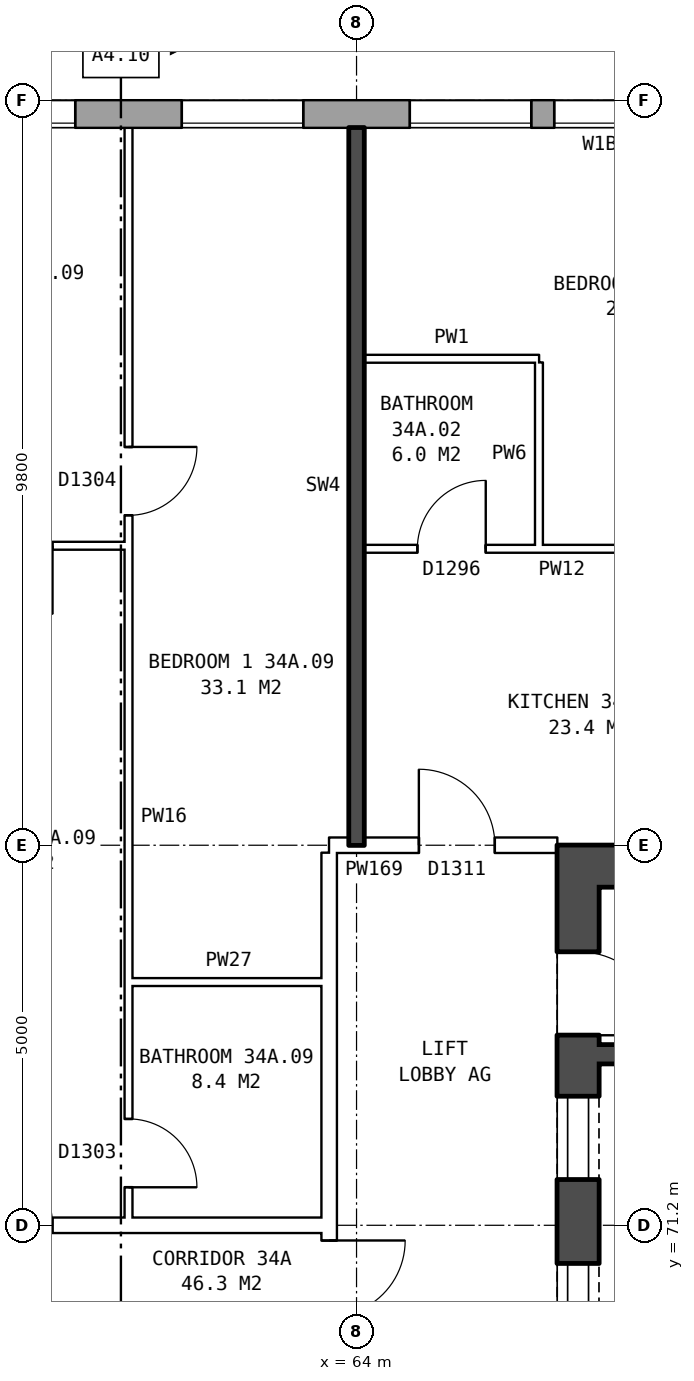
"""IFC4 building model, lengths in metres.
Left out: names, types, materials, properties, quantities, classifications, styles, units other than length and angle.
Written with IfcOpenShell. Run it as: python <this file> out.ifc"""

import sys

from ifc_helpers import new_model, si_unit, direction, frame, frame_2d, origin, place, context, subcontext, project, spatial, rectangle, extrude, element, fill, save


model = new_model("IFC4")
c1 = context("Model", 3, precision=1e-05, world=origin(), true_north=direction((0.0, 1.0)))
c2 = subcontext(c1, "Body", "Model", "MODEL_VIEW")
j1 = project(units=[si_unit("LENGTHUNIT", "METRE"), si_unit("PLANEANGLEUNIT", "RADIAN")], contexts=[c1])
p1 = place(None, origin())
s1 = spatial("IfcSite", under=j1, at=p1, CompositionType="ELEMENT")
p2 = place(p1, origin())
s2 = spatial("IfcBuilding", under=s1, at=p2, CompositionType="ELEMENT")
p3 = place(p2, frame((0.0, 0.0, 123.7)))
s3 = spatial("IfcBuildingStorey", under=s2, at=p3, CompositionType="ELEMENT", Elevation=123.7)
p4 = place(p3, frame((72.925, 85.82, 0.0), z_axis=(0.0, 0.0, 1.0), x_axis=(-1.0, 0.0, 0.0)))
e1 = element("IfcWall", 1, at=p4, inside=s3, PredefinedType="STANDARD", context=c2, shape_type="SweptSolid", body=[
    extrude(rectangle(XDim=43.101, YDim=0.36, at=frame_2d((21.55, 0.0))), origin(), (0.0, 0.0, 1.0), 2.85),
])
p5 = place(p4, frame((0.625, 0.0, 0.8)))
e2 = element("IfcOpeningElement", 2, at=p5, cuts=e1, PredefinedType="OPENING", context=c2, shape_type="SweptSolid", body=[
    extrude(rectangle(XDim=1.6, YDim=1.8, at=frame_2d((0.8, 0.9))), frame((0.0, 0.19, 0.0), z_axis=(0.0, -1.0, 0.0), x_axis=(1.0, 0.0, 0.0)), (0.0, 0.0, 1.0), 0.38),
])
p6 = place(p4, frame((4.125, 0.0, 0.8)))
e3 = element("IfcOpeningElement", 3, at=p6, cuts=e1, PredefinedType="OPENING", context=c2, shape_type="SweptSolid", body=[
    extrude(rectangle(XDim=0.6, YDim=0.9, at=frame_2d((0.3, 0.45))), frame((0.0, 0.19, 0.0), z_axis=(0.0, -1.0, 0.0), x_axis=(1.0, 0.0, 0.0)), (0.0, 0.0, 1.0), 0.38),
])
p7 = place(p4, frame((6.625, 0.0, 0.8)))
e4 = element("IfcOpeningElement", 4, at=p7, cuts=e1, PredefinedType="OPENING", context=c2, shape_type="SweptSolid", body=[
    extrude(rectangle(XDim=1.6, YDim=1.8, at=frame_2d((0.8, 0.9))), frame((0.0, 0.19, 0.0), z_axis=(0.0, -1.0, 0.0), x_axis=(1.0, 0.0, 0.0)), (0.0, 0.0, 1.0), 0.38),
])
p8 = place(p4, frame((9.625, 0.0, 0.8)))
e5 = element("IfcOpeningElement", 5, at=p8, cuts=e1, PredefinedType="OPENING", context=c2, shape_type="SweptSolid", body=[
    extrude(rectangle(XDim=1.6, YDim=1.8, at=frame_2d((0.8, 0.9))), frame((0.0, 0.19, 0.0), z_axis=(0.0, -1.0, 0.0), x_axis=(1.0, 0.0, 0.0)), (0.0, 0.0, 1.0), 0.38),
])
p9 = place(p4, frame((12.625, 0.0, 0.8)))
e6 = element("IfcOpeningElement", 6, at=p9, cuts=e1, PredefinedType="OPENING", context=c2, shape_type="SweptSolid", body=[
    extrude(rectangle(XDim=1.6, YDim=1.8, at=frame_2d((0.8, 0.9))), frame((0.0, 0.19, 0.0), z_axis=(0.0, -1.0, 0.0), x_axis=(1.0, 0.0, 0.0)), (0.0, 0.0, 1.0), 0.38),
])
p10 = place(p4, frame((15.625, 0.0, 0.8)))
e7 = element("IfcOpeningElement", 7, at=p10, cuts=e1, PredefinedType="OPENING", context=c2, shape_type="SweptSolid", body=[
    extrude(rectangle(XDim=1.6, YDim=1.8, at=frame_2d((0.8, 0.9))), frame((0.0, 0.19, 0.0), z_axis=(0.0, -1.0, 0.0), x_axis=(1.0, 0.0, 0.0)), (0.0, 0.0, 1.0), 0.38),
])
p11 = place(p4, frame((18.625, 0.0, 0.8)))
e8 = element("IfcOpeningElement", 8, at=p11, cuts=e1, PredefinedType="OPENING", context=c2, shape_type="SweptSolid", body=[
    extrude(rectangle(XDim=1.6, YDim=1.8, at=frame_2d((0.8, 0.9))), frame((0.0, 0.19, 0.0), z_axis=(0.0, -1.0, 0.0), x_axis=(1.0, 0.0, 0.0)), (0.0, 0.0, 1.0), 0.38),
])
p12 = place(p4, frame((21.625, 0.0, 0.8)))
e9 = element("IfcOpeningElement", 9, at=p12, cuts=e1, PredefinedType="OPENING", context=c2, shape_type="SweptSolid", body=[
    extrude(rectangle(XDim=1.6, YDim=1.8, at=frame_2d((0.8, 0.9))), frame((0.0, 0.19, 0.0), z_axis=(0.0, -1.0, 0.0), x_axis=(1.0, 0.0, 0.0)), (0.0, 0.0, 1.0), 0.38),
])
p13 = place(p4, frame((24.625, 0.0, 0.8)))
e10 = element("IfcOpeningElement", 10, at=p13, cuts=e1, PredefinedType="OPENING", context=c2, shape_type="SweptSolid", body=[
    extrude(rectangle(XDim=1.6, YDim=1.8, at=frame_2d((0.8, 0.9))), frame((0.0, 0.19, 0.0), z_axis=(0.0, -1.0, 0.0), x_axis=(1.0, 0.0, 0.0)), (0.0, 0.0, 1.0), 0.38),
])
p14 = place(p4, frame((27.625, 0.0, 0.8)))
e11 = element("IfcOpeningElement", 11, at=p14, cuts=e1, PredefinedType="OPENING", context=c2, shape_type="SweptSolid", body=[
    extrude(rectangle(XDim=1.6, YDim=1.8, at=frame_2d((0.8, 0.9))), frame((0.0, 0.19, 0.0), z_axis=(0.0, -1.0, 0.0), x_axis=(1.0, 0.0, 0.0)), (0.0, 0.0, 1.0), 0.38),
])
p15 = place(p4, frame((30.625, 0.0, 0.8)))
e12 = element("IfcOpeningElement", 12, at=p15, cuts=e1, PredefinedType="OPENING", context=c2, shape_type="SweptSolid", body=[
    extrude(rectangle(XDim=1.6, YDim=1.8, at=frame_2d((0.8, 0.9))), frame((0.0, 0.19, 0.0), z_axis=(0.0, -1.0, 0.0), x_axis=(1.0, 0.0, 0.0)), (0.0, 0.0, 1.0), 0.38),
])
p16 = place(p4, frame((33.625, 0.0, 0.8)))
e13 = element("IfcOpeningElement", 13, at=p16, cuts=e1, PredefinedType="OPENING", context=c2, shape_type="SweptSolid", body=[
    extrude(rectangle(XDim=1.6, YDim=1.8, at=frame_2d((0.8, 0.9))), frame((0.0, 0.19, 0.0), z_axis=(0.0, -1.0, 0.0), x_axis=(1.0, 0.0, 0.0)), (0.0, 0.0, 1.0), 0.38),
])
p17 = place(p4, frame((36.625, 0.0, 0.8)))
e14 = element("IfcOpeningElement", 14, at=p17, cuts=e1, PredefinedType="OPENING", context=c2, shape_type="SweptSolid", body=[
    extrude(rectangle(XDim=1.6, YDim=1.8, at=frame_2d((0.8, 0.9))), frame((0.0, 0.19, 0.0), z_axis=(0.0, -1.0, 0.0), x_axis=(1.0, 0.0, 0.0)), (0.0, 0.0, 1.0), 0.38),
])
p18 = place(p4, frame((40.125, 0.0, 1.7)))
e15 = element("IfcOpeningElement", 15, at=p18, cuts=e1, PredefinedType="OPENING", context=c2, shape_type="SweptSolid", body=[
    extrude(rectangle(XDim=0.6, YDim=0.9, at=frame_2d((0.3, 0.45))), frame((0.0, 0.19, 0.0), z_axis=(0.0, -1.0, 0.0), x_axis=(1.0, 0.0, 0.0)), (0.0, 0.0, 1.0), 0.38),
])
p19 = place(p4, frame((5.125, 0.0, 0.8)))
e16 = element("IfcOpeningElement", 16, at=p19, cuts=e1, PredefinedType="OPENING", context=c2, shape_type="SweptSolid", body=[
    extrude(rectangle(XDim=1.2, YDim=1.8, at=frame_2d((0.6, 0.9))), frame((0.0, 0.19, 0.0), z_axis=(0.0, -1.0, 0.0), x_axis=(1.0, 0.0, 0.0)), (0.0, 0.0, 1.0), 0.38),
])
p20 = place(p4, frame((41.125, 0.0, 0.8)))
e17 = element("IfcOpeningElement", 17, at=p20, cuts=e1, PredefinedType="OPENING", context=c2, shape_type="SweptSolid", body=[
    extrude(rectangle(XDim=1.6, YDim=1.8, at=frame_2d((0.8, 0.9))), frame((0.0, 0.19, 0.0), z_axis=(0.0, -1.0, 0.0), x_axis=(1.0, 0.0, 0.0)), (0.0, 0.0, 1.0), 0.38),
])
p21 = place(p3, frame((66.915, 63.8, 0.0), z_axis=(0.0, 0.0, 1.0), x_axis=(0.0, 1.0, 0.0)))
e18 = element("IfcWall", 18, at=p21, inside=s3, PredefinedType="SHEAR", context=c2, shape_type="SweptSolid", body=[
    extrude(rectangle(XDim=12.4, YDim=0.55, at=frame_2d((6.2, 0.0))), origin(), (0.0, 0.0, 1.0), 2.85),
])
p22 = place(p21, frame((1.325, 0.0, 0.0)))
e19 = element("IfcOpeningElement", 19, at=p22, cuts=e18, PredefinedType="OPENING", context=c2, shape_type="SweptSolid", body=[
    extrude(rectangle(XDim=1.1, YDim=2.1, at=frame_2d((0.55, 1.05))), frame((0.0, 0.285, 0.0), z_axis=(0.0, -1.0, 0.0), x_axis=(1.0, 0.0, 0.0)), (0.0, 0.0, 1.0), 0.57),
])
p23 = place(p21, frame((3.6, 0.0, 0.0)))
e20 = element("IfcOpeningElement", 20, at=p23, cuts=e18, PredefinedType="OPENING", context=c2, shape_type="SweptSolid", body=[
    extrude(rectangle(XDim=1.1, YDim=2.1, at=frame_2d((0.55, 1.05))), frame((0.0, 0.285, 0.0), z_axis=(0.0, -1.0, 0.0), x_axis=(1.0, 0.0, 0.0)), (0.0, 0.0, 1.0), 0.57),
])
p24 = place(p21, frame((5.8, 0.0, 0.0)))
e21 = element("IfcOpeningElement", 21, at=p24, cuts=e18, PredefinedType="OPENING", context=c2, shape_type="SweptSolid", body=[
    extrude(rectangle(XDim=1.1, YDim=2.1, at=frame_2d((0.55, 1.05))), frame((0.0, 0.285, 0.0), z_axis=(0.0, -1.0, 0.0), x_axis=(1.0, 0.0, 0.0)), (0.0, 0.0, 1.0), 0.57),
])
p25 = place(p21, frame((8.0, 0.0, 0.0)))
e22 = element("IfcOpeningElement", 22, at=p25, cuts=e18, PredefinedType="OPENING", context=c2, shape_type="SweptSolid", body=[
    extrude(rectangle(XDim=1.1, YDim=2.1, at=frame_2d((0.55, 1.05))), frame((0.0, 0.285, 0.0), z_axis=(0.0, -1.0, 0.0), x_axis=(1.0, 0.0, 0.0)), (0.0, 0.0, 1.0), 0.57),
])
p26 = place(p21, frame((9.9, 0.0, 0.0)))
e23 = element("IfcOpeningElement", 23, at=p26, cuts=e18, PredefinedType="OPENING", context=c2, shape_type="SweptSolid", body=[
    extrude(rectangle(XDim=1.1, YDim=2.1, at=frame_2d((0.55, 1.05))), frame((0.0, 0.285, 0.0), z_axis=(0.0, -1.0, 0.0), x_axis=(1.0, 0.0, 0.0)), (0.0, 0.0, 1.0), 0.57),
])
p27 = place(p3, frame((67.19, 75.925, 0.0), z_axis=(0.0, 0.0, 1.0), x_axis=(1.0, 0.0, 0.0)))
e24 = element("IfcWall", 24, at=p27, inside=s3, PredefinedType="SHEAR", context=c2, shape_type="SweptSolid", body=[
    extrude(rectangle(XDim=7.9, YDim=0.55, at=frame_2d((3.95, 0.0))), origin(), (0.0, 0.0, 1.0), 2.85),
])
p28 = place(p3, frame((67.19, 73.45, 0.0), z_axis=(0.0, 0.0, 1.0), x_axis=(1.0, 0.0, 0.0)))
e25 = element("IfcWall", 25, at=p28, inside=s3, PredefinedType="SHEAR", context=c2, shape_type="SweptSolid", body=[
    extrude(rectangle(XDim=2.375, YDim=0.25, at=frame_2d((1.188, 0.0))), origin(), (0.0, 0.0, 1.0), 2.85),
])
p29 = place(p3, frame((63.64, 63.9, 0.0), z_axis=(0.0, 0.0, 1.0), x_axis=(0.0, 1.0, 0.0)))
e26 = element("IfcWall", 26, at=p29, inside=s3, PredefinedType="PARTITIONING", context=c2, shape_type="SweptSolid", body=[
    extrude(rectangle(XDim=12.2, YDim=0.2, at=frame_2d((6.1, 0.0))), origin(), (0.0, 0.0, 1.0), 2.85),
])
p30 = place(p29, frame((5.1, 0.0, 0.0)))
e27 = element("IfcOpeningElement", 27, at=p30, cuts=e26, PredefinedType="OPENING", context=c2, shape_type="SweptSolid", body=[
    extrude(rectangle(XDim=2.0, YDim=2.1, at=frame_2d((1.0, 1.05))), frame((0.0, 0.11, 0.0), z_axis=(0.0, -1.0, 0.0), x_axis=(1.0, 0.0, 0.0)), (0.0, 0.0, 1.0), 0.22),
])
p31 = place(p3, frame((44.36, 71.2, 0.0), z_axis=(0.0, 0.0, 1.0), x_axis=(1.0, 0.0, 0.0)))
e28 = element("IfcWall", 28, at=p31, inside=s3, PredefinedType="PARTITIONING", context=c2, shape_type="SweptSolid", body=[
    extrude(rectangle(XDim=19.28, YDim=0.2, at=frame_2d((9.64, 0.0))), origin(), (0.0, 0.0, 1.0), 2.85),
])
p32 = place(p31, frame((14.64, 0.0, 0.0)))
e29 = element("IfcOpeningElement", 29, at=p32, cuts=e28, PredefinedType="OPENING", context=c2, shape_type="SweptSolid", body=[
    extrude(rectangle(XDim=1.0, YDim=2.1, at=frame_2d((0.5, 1.05))), frame((0.0, 0.11, 0.0), z_axis=(0.0, -1.0, 0.0), x_axis=(1.0, 0.0, 0.0)), (0.0, 0.0, 1.0), 0.22),
])
p33 = place(p31, frame((5.64, 0.0, 0.0)))
e30 = element("IfcOpeningElement", 30, at=p33, cuts=e28, PredefinedType="OPENING", context=c2, shape_type="SweptSolid", body=[
    extrude(rectangle(XDim=1.0, YDim=2.1, at=frame_2d((0.5, 1.05))), frame((0.0, 0.11, 0.0), z_axis=(0.0, -1.0, 0.0), x_axis=(1.0, 0.0, 0.0)), (0.0, 0.0, 1.0), 0.22),
])
p34 = place(p3, frame((61.0, 74.4, 0.0), z_axis=(0.0, 0.0, 1.0), x_axis=(1.0, 0.0, 0.0)))
e31 = element("IfcWall", 31, at=p34, inside=s3, PredefinedType="PARTITIONING", context=c2, shape_type="SweptSolid", body=[
    extrude(rectangle(XDim=2.64, YDim=0.1, at=frame_2d((1.32, 0.0))), origin(), (0.0, 0.0, 1.0), 2.85),
])
p35 = place(p3, frame((63.64, 76.2, 0.0), z_axis=(0.0, 0.0, 1.0), x_axis=(1.0, 0.0, 0.0)))
e32 = element("IfcWall", 32, at=p35, inside=s3, PredefinedType="PARTITIONING", context=c2, shape_type="SweptSolid", body=[
    extrude(rectangle(XDim=3.0, YDim=0.2, at=frame_2d((1.5, 0.0))), origin(), (0.0, 0.0, 1.0), 2.85),
])
p36 = place(p35, frame((1.18, 0.0, 0.0)))
e33 = element("IfcOpeningElement", 33, at=p36, cuts=e32, PredefinedType="OPENING", context=c2, shape_type="SweptSolid", body=[
    extrude(rectangle(XDim=1.0, YDim=2.1, at=frame_2d((0.5, 1.05))), frame((0.0, 0.11, 0.0), z_axis=(0.0, -1.0, 0.0), x_axis=(1.0, 0.0, 0.0)), (0.0, 0.0, 1.0), 0.22),
])
p37 = place(p3, frame((64.1, 80.1, 0.0), z_axis=(0.0, 0.0, 1.0), x_axis=(1.0, 0.0, 0.0)))
e34 = element("IfcWall", 34, at=p37, inside=s3, PredefinedType="PARTITIONING", context=c2, shape_type="SweptSolid", body=[
    extrude(rectangle(XDim=5.8, YDim=0.1, at=frame_2d((2.9, 0.0))), origin(), (0.0, 0.0, 1.0), 2.85),
])
p38 = place(p37, frame((3.6, 0.0, 0.0)))
e35 = element("IfcOpeningElement", 35, at=p38, cuts=e34, PredefinedType="OPENING", context=c2, shape_type="SweptSolid", body=[
    extrude(rectangle(XDim=0.9, YDim=2.1, at=frame_2d((0.45, 1.05))), frame((0.0, 0.06, 0.0), z_axis=(0.0, -1.0, 0.0), x_axis=(1.0, 0.0, 0.0)), (0.0, 0.0, 1.0), 0.12),
])
p39 = place(p37, frame((0.7, 0.0, 0.0)))
e36 = element("IfcOpeningElement", 36, at=p39, cuts=e34, PredefinedType="OPENING", context=c2, shape_type="SweptSolid", body=[
    extrude(rectangle(XDim=0.9, YDim=2.1, at=frame_2d((0.45, 1.05))), frame((0.0, 0.06, 0.0), z_axis=(0.0, -1.0, 0.0), x_axis=(1.0, 0.0, 0.0)), (0.0, 0.0, 1.0), 0.12),
])
p40 = place(p3, frame((58.1, 80.14, 0.0), z_axis=(0.0, 0.0, 1.0), x_axis=(1.0, 0.0, 0.0)))
e37 = element("IfcWall", 37, at=p40, inside=s3, PredefinedType="PARTITIONING", context=c2, shape_type="SweptSolid", body=[
    extrude(rectangle(XDim=2.9, YDim=0.1, at=frame_2d((1.45, 0.0))), origin(), (0.0, 0.0, 1.0), 2.85),
])
p41 = place(p40, frame((1.0, 0.0, 0.0)))
e38 = element("IfcOpeningElement", 38, at=p41, cuts=e37, PredefinedType="OPENING", context=c2, shape_type="SweptSolid", body=[
    extrude(rectangle(XDim=0.9, YDim=2.1, at=frame_2d((0.45, 1.05))), frame((0.0, 0.06, 0.0), z_axis=(0.0, -1.0, 0.0), x_axis=(1.0, 0.0, 0.0)), (0.0, 0.0, 1.0), 0.12),
])
p42 = place(p3, frame((64.1, 82.6, 0.0), z_axis=(0.0, 0.0, 1.0), x_axis=(1.0, 0.0, 0.0)))
e39 = element("IfcWall", 39, at=p42, inside=s3, PredefinedType="PARTITIONING", context=c2, shape_type="SweptSolid", body=[
    extrude(rectangle(XDim=2.3, YDim=0.1, at=frame_2d((1.15, 0.0))), origin(), (0.0, 0.0, 1.0), 2.85),
])
p43 = place(p3, frame((61.0, 71.3, 0.0), z_axis=(0.0, 0.0, 1.0), x_axis=(0.0, 1.0, 0.0)))
e40 = element("IfcWall", 40, at=p43, inside=s3, PredefinedType="PARTITIONING", context=c2, shape_type="SweptSolid", body=[
    extrude(rectangle(XDim=14.34, YDim=0.1, at=frame_2d((7.17, 0.0))), origin(), (0.0, 0.0, 1.0), 2.85),
])
p44 = place(p43, frame((9.24, 0.0, 0.0)))
e41 = element("IfcOpeningElement", 41, at=p44, cuts=e40, PredefinedType="OPENING", context=c2, shape_type="SweptSolid", body=[
    extrude(rectangle(XDim=0.9, YDim=2.1, at=frame_2d((0.45, 1.05))), frame((0.0, 0.06, 0.0), z_axis=(0.0, -1.0, 0.0), x_axis=(1.0, 0.0, 0.0)), (0.0, 0.0, 1.0), 0.12),
])
p45 = place(p43, frame((0.4, 0.0, 0.0)))
e42 = element("IfcOpeningElement", 42, at=p45, cuts=e40, PredefinedType="OPENING", context=c2, shape_type="SweptSolid", body=[
    extrude(rectangle(XDim=0.9, YDim=2.1, at=frame_2d((0.45, 1.05))), frame((0.0, 0.06, 0.0), z_axis=(0.0, -1.0, 0.0), x_axis=(1.0, 0.0, 0.0)), (0.0, 0.0, 1.0), 0.12),
])
p46 = place(p3, frame((64.0, 76.2, 0.0), z_axis=(0.0, 0.0, 1.0), x_axis=(0.0, 1.0, 0.0)))
e43 = element("IfcWall", 43, at=p46, inside=s3, PredefinedType="SOLIDWALL", context=c2, shape_type="SweptSolid", body=[
    extrude(rectangle(XDim=9.44, YDim=0.2, at=frame_2d((4.72, 0.0))), origin(), (0.0, 0.0, 1.0), 2.85),
])
p47 = place(p3, frame((66.4, 80.15, 0.0), z_axis=(0.0, 0.0, 1.0), x_axis=(0.0, 1.0, 0.0)))
e44 = element("IfcWall", 44, at=p47, inside=s3, PredefinedType="PARTITIONING", context=c2, shape_type="SweptSolid", body=[
    extrude(rectangle(XDim=2.4, YDim=0.1, at=frame_2d((1.2, 0.0))), origin(), (0.0, 0.0, 1.0), 2.85),
])
p48 = place(p7, origin())
e45 = element("IfcWindow", 45, at=p48, inside=s3, PartitioningType="SINGLE_PANEL", PredefinedType="WINDOW", context=c2, shape_type="SweptSolid", body=[
    extrude(rectangle(XDim=1.6, YDim=1.8, at=frame_2d((0.8, 0.9))), frame((0.0, 0.15, 0.0), z_axis=(0.0, -1.0, 0.0), x_axis=(1.0, 0.0, 0.0)), (0.0, 0.0, 1.0), 0.06),
])
fill(e4, e45)
p49 = place(p8, origin())
e46 = element("IfcWindow", 46, at=p49, inside=s3, PartitioningType="SINGLE_PANEL", PredefinedType="WINDOW", context=c2, shape_type="SweptSolid", body=[
    extrude(rectangle(XDim=1.6, YDim=1.8, at=frame_2d((0.8, 0.9))), frame((0.0, 0.15, 0.0), z_axis=(0.0, -1.0, 0.0), x_axis=(1.0, 0.0, 0.0)), (0.0, 0.0, 1.0), 0.06),
])
fill(e5, e46)
p50 = place(p9, origin())
e47 = element("IfcWindow", 47, at=p50, inside=s3, PartitioningType="SINGLE_PANEL", PredefinedType="WINDOW", context=c2, shape_type="SweptSolid", body=[
    extrude(rectangle(XDim=1.6, YDim=1.8, at=frame_2d((0.8, 0.9))), frame((0.0, 0.15, 0.0), z_axis=(0.0, -1.0, 0.0), x_axis=(1.0, 0.0, 0.0)), (0.0, 0.0, 1.0), 0.06),
])
fill(e6, e47)
p51 = place(p24, origin())
e48 = element("IfcDoor", 48, at=p51, inside=s3, OperationType="DOUBLE_DOOR_SLIDING", PredefinedType="DOOR", context=c2, shape_type="SweptSolid", body=[
    extrude(rectangle(XDim=1.1, YDim=2.1, at=frame_2d((0.55, 1.05))), frame((0.0, -0.21, 0.0), z_axis=(0.0, -1.0, 0.0), x_axis=(1.0, 0.0, 0.0)), (0.0, 0.0, 1.0), 0.05),
])
fill(e21, e48)
p52 = place(p25, origin())
e49 = element("IfcDoor", 49, at=p52, inside=s3, OperationType="DOUBLE_DOOR_SLIDING", PredefinedType="DOOR", context=c2, shape_type="SweptSolid", body=[
    extrude(rectangle(XDim=1.1, YDim=2.1, at=frame_2d((0.55, 1.05))), frame((0.0, -0.21, 0.0), z_axis=(0.0, -1.0, 0.0), x_axis=(1.0, 0.0, 0.0)), (0.0, 0.0, 1.0), 0.05),
])
fill(e22, e49)
p53 = place(p26, frame((1.1, 0.0, 0.0), z_axis=(0.0, 0.0, 1.0), x_axis=(-1.0, 0.0, 0.0)))
e50 = element("IfcDoor", 50, at=p53, inside=s3, OperationType="SINGLE_SWING_RIGHT", PredefinedType="DOOR", context=c2, shape_type="SweptSolid", body=[
    extrude(rectangle(XDim=1.1, YDim=2.1, at=frame_2d((0.55, 1.05))), frame((0.0, 0.26, 0.0), z_axis=(0.0, -1.0, 0.0), x_axis=(1.0, 0.0, 0.0)), (0.0, 0.0, 1.0), 0.05),
])
fill(e23, e50)
p54 = place(p30, frame((2.0, 0.0, 0.0), z_axis=(0.0, 0.0, 1.0), x_axis=(-1.0, 0.0, 0.0)))
e51 = element("IfcDoor", 51, at=p54, inside=s3, OperationType="DOUBLE_DOOR_SINGLE_SWING", PredefinedType="DOOR", context=c2, shape_type="SweptSolid", body=[
    extrude(rectangle(XDim=2.0, YDim=2.1, at=frame_2d((1.0, 1.05))), frame((0.0, 0.025, 0.0), z_axis=(0.0, -1.0, 0.0), x_axis=(1.0, 0.0, 0.0)), (0.0, 0.0, 1.0), 0.05),
])
fill(e27, e51)
p55 = place(p36, origin())
e52 = element("IfcDoor", 52, at=p55, inside=s3, OperationType="SINGLE_SWING_LEFT", PredefinedType="DOOR", context=c2, shape_type="SweptSolid", body=[
    extrude(rectangle(XDim=1.0, YDim=2.1, at=frame_2d((0.5, 1.05))), frame((0.0, 0.025, 0.0), z_axis=(0.0, -1.0, 0.0), x_axis=(1.0, 0.0, 0.0)), (0.0, 0.0, 1.0), 0.05),
])
fill(e33, e52)
p56 = place(p39, origin())
e53 = element("IfcDoor", 53, at=p56, inside=s3, OperationType="SINGLE_SWING_RIGHT", PredefinedType="DOOR", context=c2, shape_type="SweptSolid", body=[
    extrude(rectangle(XDim=0.9, YDim=2.1, at=frame_2d((0.45, 1.05))), frame((0.0, 0.025, 0.0), z_axis=(0.0, -1.0, 0.0), x_axis=(1.0, 0.0, 0.0)), (0.0, 0.0, 1.0), 0.05),
])
fill(e36, e53)
p57 = place(p44, frame((0.9, 0.0, 0.0), z_axis=(0.0, 0.0, 1.0), x_axis=(-1.0, 0.0, 0.0)))
e54 = element("IfcDoor", 54, at=p57, inside=s3, OperationType="SINGLE_SWING_LEFT", PredefinedType="DOOR", context=c2, shape_type="SweptSolid", body=[
    extrude(rectangle(XDim=0.9, YDim=2.1, at=frame_2d((0.45, 1.05))), frame((0.0, 0.025, 0.0), z_axis=(0.0, -1.0, 0.0), x_axis=(1.0, 0.0, 0.0)), (0.0, 0.0, 1.0), 0.05),
])
fill(e41, e54)
p58 = place(p45, frame((0.9, 0.0, 0.0), z_axis=(0.0, 0.0, 1.0), x_axis=(-1.0, 0.0, 0.0)))
e55 = element("IfcDoor", 55, at=p58, inside=s3, OperationType="SINGLE_SWING_RIGHT", PredefinedType="DOOR", context=c2, shape_type="SweptSolid", body=[
    extrude(rectangle(XDim=0.9, YDim=2.1, at=frame_2d((0.45, 1.05))), frame((0.0, 0.025, 0.0), z_axis=(0.0, -1.0, 0.0), x_axis=(1.0, 0.0, 0.0)), (0.0, 0.0, 1.0), 0.05),
])
fill(e42, e55)
p59 = place(p19, origin())
e56 = element("IfcWindow", 56, at=p59, inside=s3, PartitioningType="SINGLE_PANEL", PredefinedType="WINDOW", context=c2, shape_type="SweptSolid", body=[
    extrude(rectangle(XDim=1.2, YDim=1.8, at=frame_2d((0.6, 0.9))), frame((0.0, 0.15, 0.0), z_axis=(0.0, -1.0, 0.0), x_axis=(1.0, 0.0, 0.0)), (0.0, 0.0, 1.0), 0.06),
])
fill(e16, e56)
save(model, sys.argv[1])
